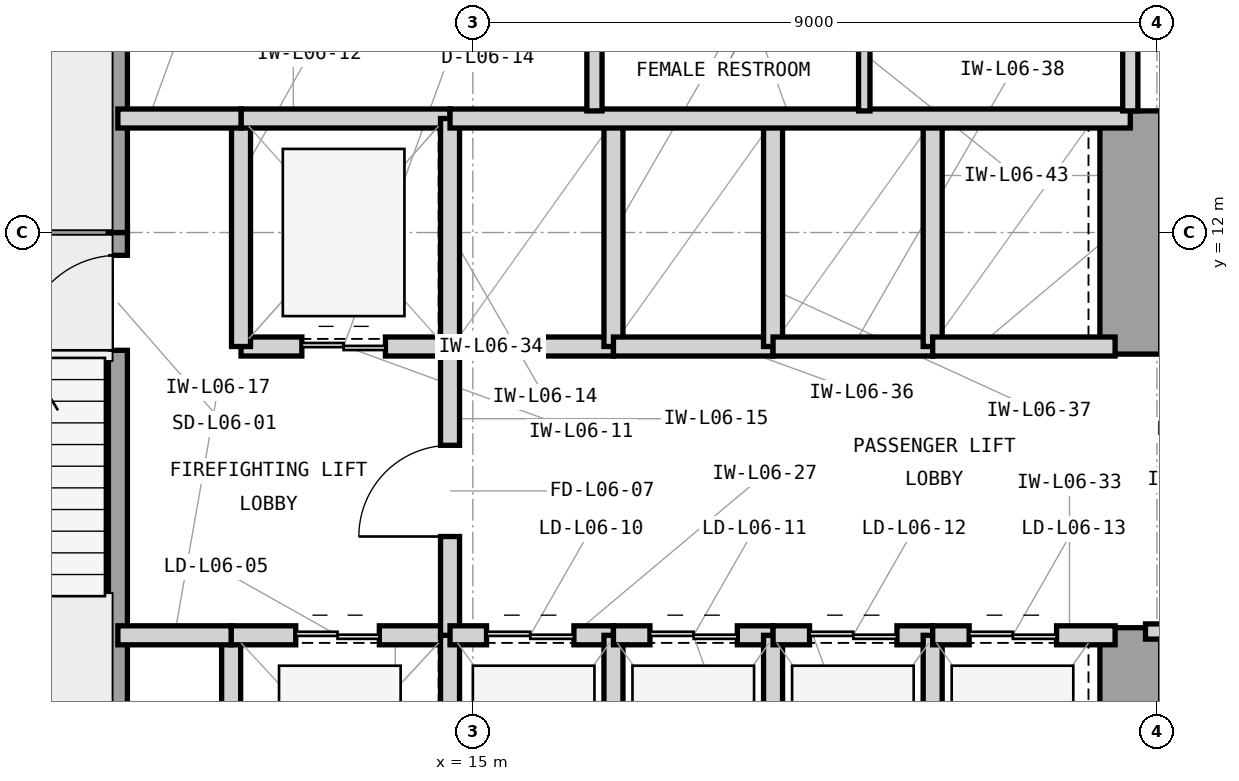
"""IFC4 building model, lengths in metres.
Left out: names, types, materials, properties, quantities, classifications, styles, units other than length and angle.
Written with IfcOpenShell. Run it as: python <this file> out.ifc"""

import sys

from ifc_helpers import new_model, si_unit, direction, frame, frame_2d, origin, place, context, subcontext, project, spatial, rectangle, extrude, element, fill, save


model = new_model("IFC4")
c1 = context("Model", 3, precision=1e-05, world=origin(), true_north=direction((0.0, 1.0)))
c2 = subcontext(c1, "Body", "Model", "MODEL_VIEW")
j1 = project(units=[si_unit("LENGTHUNIT", "METRE"), si_unit("PLANEANGLEUNIT", "RADIAN")], contexts=[c1])
p1 = place(None, origin())
s1 = spatial("IfcSite", under=j1, at=p1, CompositionType="ELEMENT")
p2 = place(p1, origin())
s2 = spatial("IfcBuilding", under=s1, at=p2, CompositionType="ELEMENT")
p3 = place(p2, frame((0.0, 0.0, 30.0)))
s3 = spatial("IfcBuildingStorey", under=s2, at=p3, CompositionType="ELEMENT", Elevation=30.0)
p4 = place(p3, frame((23.65, 3.75, 0.0), z_axis=(0.0, 0.0, 1.0), x_axis=(0.0, 1.0, 0.0)))
e1 = element("IfcWall", 1, at=p4, inside=s3, PredefinedType="SHEAR", context=c2, shape_type="SweptSolid", body=[
    extrude(rectangle(XDim=3.05, YDim=0.8, at=frame_2d((1.525, 0.0))), origin(), (0.0, 0.0, 1.0), 4.2),
])
p5 = place(p3, frame((23.65, 10.4, 0.0), z_axis=(0.0, 0.0, 1.0), x_axis=(0.0, 1.0, 0.0)))
e2 = element("IfcWall", 2, at=p5, inside=s3, PredefinedType="SHEAR", context=c2, shape_type="SweptSolid", body=[
    extrude(rectangle(XDim=3.2, YDim=0.8, at=frame_2d((1.6, 0.0))), origin(), (0.0, 0.0, 1.0), 4.2),
])
p6 = place(p3, frame((6.35, 12.0, 0.0), z_axis=(0.0, 0.0, 1.0), x_axis=(1.0, 0.0, 0.0)))
e3 = element("IfcWall", 3, at=p6, inside=s3, PredefinedType="SHEAR", context=c2, shape_type="SweptSolid", body=[
    extrude(rectangle(XDim=4.105, YDim=0.25, at=frame_2d((2.052, 0.0))), origin(), (0.0, 0.0, 1.0), 4.2),
])
p7 = place(p3, frame((10.33, 4.55, 0.0), z_axis=(0.0, 0.0, 1.0), x_axis=(0.0, 1.0, 0.0)))
e4 = element("IfcWall", 4, at=p7, inside=s3, PredefinedType="SHEAR", context=c2, shape_type="SweptSolid", body=[
    extrude(rectangle(XDim=7.45, YDim=0.25, at=frame_2d((3.725, 0.0))), origin(), (0.0, 0.0, 1.0), 4.2),
])
p8 = place(p7, frame((5.9, 0.0, 0.0)))
e5 = element("IfcOpeningElement", 5, at=p8, cuts=e4, PredefinedType="OPENING", context=c2, shape_type="SweptSolid", body=[
    extrude(rectangle(XDim=1.25, YDim=2.2, at=frame_2d((0.625, 1.1))), frame((0.0, 0.135, 0.0), z_axis=(0.0, -1.0, 0.0), x_axis=(1.0, 0.0, 0.0)), (0.0, 0.0, 1.0), 0.27),
])
p9 = place(p3, frame((10.33, 12.0, 0.0), z_axis=(0.0, 0.0, 1.0), x_axis=(0.0, 1.0, 0.0)))
e6 = element("IfcWall", 6, at=p9, inside=s3, PredefinedType="SHEAR", context=c2, shape_type="SweptSolid", body=[
    extrude(rectangle(XDim=7.45, YDim=0.25, at=frame_2d((3.725, 0.0))), origin(), (0.0, 0.0, 1.0), 4.2),
])
p10 = place(p9, frame((5.85, 0.0, 0.0)))
e7 = element("IfcOpeningElement", 7, at=p10, cuts=e6, PredefinedType="OPENING", context=c2, shape_type="SweptSolid", body=[
    extrude(rectangle(XDim=1.25, YDim=2.2, at=frame_2d((0.625, 1.1))), frame((0.0, 0.135, 0.0), z_axis=(0.0, -1.0, 0.0), x_axis=(1.0, 0.0, 0.0)), (0.0, 0.0, 1.0), 0.27),
])
p11 = place(p3, frame((11.82, 3.35, 0.0), z_axis=(0.0, 0.0, 1.0), x_axis=(0.0, 1.0, 0.0)))
e8 = element("IfcWall", 8, at=p11, inside=s3, PredefinedType="PARTITIONING", context=c2, shape_type="SweptSolid", body=[
    extrude(rectangle(XDim=3.35, YDim=0.25, at=frame_2d((1.675, 0.0))), origin(), (0.0, 0.0, 1.0), 3.97),
])
p12 = place(p3, frame((11.82, 6.7, 0.0), z_axis=(0.0, 0.0, 1.0), x_axis=(1.0, 0.0, 0.0)))
e9 = element("IfcWall", 9, at=p12, inside=s3, PredefinedType="PARTITIONING", context=c2, shape_type="SweptSolid", body=[
    extrude(rectangle(XDim=2.88, YDim=0.25, at=frame_2d((1.44, 0.0))), origin(), (0.0, 0.0, 1.0), 3.426),
])
p13 = place(p12, frame((0.85, 0.0, 0.0)))
e10 = element("IfcOpeningElement", 10, at=p13, cuts=e9, PredefinedType="OPENING", context=c2, shape_type="SweptSolid", body=[
    extrude(rectangle(XDim=1.1, YDim=2.25, at=frame_2d((0.55, 1.125))), frame((0.0, 0.135, 0.0), z_axis=(0.0, -1.0, 0.0), x_axis=(1.0, 0.0, 0.0)), (0.0, 0.0, 1.0), 0.27),
])
p14 = place(p3, frame((14.7, 3.35, 0.0), z_axis=(0.0, 0.0, 1.0), x_axis=(0.0, 1.0, 0.0)))
e11 = element("IfcWall", 11, at=p14, inside=s3, PredefinedType="PARTITIONING", context=c2, shape_type="SweptSolid", body=[
    extrude(rectangle(XDim=3.35, YDim=0.25, at=frame_2d((1.675, 0.0))), origin(), (0.0, 0.0, 1.0), 3.97),
])
p15 = place(p3, frame((11.95, 10.5, 0.0), z_axis=(0.0, 0.0, 1.0), x_axis=(1.0, 0.0, 0.0)))
e12 = element("IfcWall", 12, at=p15, inside=s3, PredefinedType="PARTITIONING", context=c2, shape_type="SweptSolid", body=[
    extrude(rectangle(XDim=2.75, YDim=0.25, at=frame_2d((1.375, 0.0))), origin(), (0.0, 0.0, 1.0), 3.426),
])
p16 = place(p15, frame((0.8, 0.0, 0.0)))
e13 = element("IfcOpeningElement", 13, at=p16, cuts=e12, PredefinedType="OPENING", context=c2, shape_type="SweptSolid", body=[
    extrude(rectangle(XDim=1.1, YDim=2.25, at=frame_2d((0.55, 1.125))), frame((0.0, 0.135, 0.0), z_axis=(0.0, -1.0, 0.0), x_axis=(1.0, 0.0, 0.0)), (0.0, 0.0, 1.0), 0.27),
])
p17 = place(p3, frame((11.95, 10.5, 0.0), z_axis=(0.0, 0.0, 1.0), x_axis=(0.0, 1.0, 0.0)))
e14 = element("IfcWall", 14, at=p17, inside=s3, PredefinedType="PARTITIONING", context=c2, shape_type="SweptSolid", body=[
    extrude(rectangle(XDim=3.0, YDim=0.25, at=frame_2d((1.5, 0.0))), origin(), (0.0, 0.0, 1.0), 3.97),
])
p18 = place(p3, frame((11.95, 13.5, 0.0), z_axis=(0.0, 0.0, 1.0), x_axis=(1.0, 0.0, 0.0)))
e15 = element("IfcWall", 15, at=p18, inside=s3, PredefinedType="PARTITIONING", context=c2, shape_type="SweptSolid", body=[
    extrude(rectangle(XDim=2.75, YDim=0.25, at=frame_2d((1.375, 0.0))), origin(), (0.0, 0.0, 1.0), 3.426),
])
p19 = place(p3, frame((14.7, 10.5, 0.0), z_axis=(0.0, 0.0, 1.0), x_axis=(0.0, 1.0, 0.0)))
e16 = element("IfcWall", 16, at=p19, inside=s3, PredefinedType="PARTITIONING", context=c2, shape_type="SweptSolid", body=[
    extrude(rectangle(XDim=3.0, YDim=0.25, at=frame_2d((1.5, 0.0))), origin(), (0.0, 0.0, 1.0), 3.97),
])
p20 = place(p3, frame((14.7, 6.7, 0.0), z_axis=(0.0, 0.0, 1.0), x_axis=(0.0, 1.0, 0.0)))
e17 = element("IfcWall", 17, at=p20, inside=s3, PredefinedType="PARTITIONING", context=c2, shape_type="SweptSolid", body=[
    extrude(rectangle(XDim=3.8, YDim=0.25, at=frame_2d((1.9, 0.0))), origin(), (0.0, 0.0, 1.0), 3.97),
])
p21 = place(p20, frame((1.3, 0.0, 0.0)))
e18 = element("IfcOpeningElement", 18, at=p21, cuts=e17, PredefinedType="OPENING", context=c2, shape_type="SweptSolid", body=[
    extrude(rectangle(XDim=1.2, YDim=2.2, at=frame_2d((0.6, 1.1))), frame((0.0, 0.135, 0.0), z_axis=(0.0, -1.0, 0.0), x_axis=(1.0, 0.0, 0.0)), (0.0, 0.0, 1.0), 0.27),
])
p22 = place(p3, frame((10.33, 13.5, 0.0), z_axis=(0.0, 0.0, 1.0), x_axis=(1.0, 0.0, 0.0)))
e19 = element("IfcWall", 19, at=p22, inside=s3, PredefinedType="PARTITIONING", context=c2, shape_type="SweptSolid", body=[
    extrude(rectangle(XDim=1.62, YDim=0.25, at=frame_2d((0.81, 0.0))), origin(), (0.0, 0.0, 1.0), 3.426),
])
p23 = place(p3, frame((10.33, 6.7, 0.0), z_axis=(0.0, 0.0, 1.0), x_axis=(1.0, 0.0, 0.0)))
e20 = element("IfcWall", 20, at=p23, inside=s3, PredefinedType="PARTITIONING", context=c2, shape_type="SweptSolid", body=[
    extrude(rectangle(XDim=1.49, YDim=0.25, at=frame_2d((0.745, 0.0))), origin(), (0.0, 0.0, 1.0), 3.426),
])
p24 = place(p3, frame((14.7, 6.7, 0.0), z_axis=(0.0, 0.0, 1.0), x_axis=(1.0, 0.0, 0.0)))
e21 = element("IfcWall", 21, at=p24, inside=s3, PredefinedType="PARTITIONING", context=c2, shape_type="SweptSolid", body=[
    extrude(rectangle(XDim=2.15, YDim=0.25, at=frame_2d((1.075, 0.0))), origin(), (0.0, 0.0, 1.0), 3.426),
])
p25 = place(p24, frame((0.48, 0.0, 0.0)))
e22 = element("IfcOpeningElement", 22, at=p25, cuts=e21, PredefinedType="OPENING", context=c2, shape_type="SweptSolid", body=[
    extrude(rectangle(XDim=1.15, YDim=2.25, at=frame_2d((0.575, 1.125))), frame((0.0, 0.135, 0.0), z_axis=(0.0, -1.0, 0.0), x_axis=(1.0, 0.0, 0.0)), (0.0, 0.0, 1.0), 0.27),
])
p26 = place(p3, frame((16.85, 3.35, 0.0), z_axis=(0.0, 0.0, 1.0), x_axis=(0.0, 1.0, 0.0)))
e23 = element("IfcWall", 23, at=p26, inside=s3, PredefinedType="PARTITIONING", context=c2, shape_type="SweptSolid", body=[
    extrude(rectangle(XDim=3.35, YDim=0.25, at=frame_2d((1.675, 0.0))), origin(), (0.0, 0.0, 1.0), 3.97),
])
p27 = place(p3, frame((16.85, 6.7, 0.0), z_axis=(0.0, 0.0, 1.0), x_axis=(1.0, 0.0, 0.0)))
e24 = element("IfcWall", 24, at=p27, inside=s3, PredefinedType="PARTITIONING", context=c2, shape_type="SweptSolid", body=[
    extrude(rectangle(XDim=2.1, YDim=0.25, at=frame_2d((1.05, 0.0))), origin(), (0.0, 0.0, 1.0), 3.426),
])
p28 = place(p27, frame((0.48, 0.0, 0.0)))
e25 = element("IfcOpeningElement", 25, at=p28, cuts=e24, PredefinedType="OPENING", context=c2, shape_type="SweptSolid", body=[
    extrude(rectangle(XDim=1.15, YDim=2.25, at=frame_2d((0.575, 1.125))), frame((0.0, 0.135, 0.0), z_axis=(0.0, -1.0, 0.0), x_axis=(1.0, 0.0, 0.0)), (0.0, 0.0, 1.0), 0.27),
])
p29 = place(p3, frame((18.95, 3.35, 0.0), z_axis=(0.0, 0.0, 1.0), x_axis=(0.0, 1.0, 0.0)))
e26 = element("IfcWall", 26, at=p29, inside=s3, PredefinedType="PARTITIONING", context=c2, shape_type="SweptSolid", body=[
    extrude(rectangle(XDim=3.35, YDim=0.25, at=frame_2d((1.675, 0.0))), origin(), (0.0, 0.0, 1.0), 3.97),
])
p30 = place(p3, frame((18.95, 6.7, 0.0), z_axis=(0.0, 0.0, 1.0), x_axis=(1.0, 0.0, 0.0)))
e27 = element("IfcWall", 27, at=p30, inside=s3, PredefinedType="PARTITIONING", context=c2, shape_type="SweptSolid", body=[
    extrude(rectangle(XDim=2.1, YDim=0.25, at=frame_2d((1.05, 0.0))), origin(), (0.0, 0.0, 1.0), 3.426),
])
p31 = place(p30, frame((0.48, 0.0, 0.0)))
e28 = element("IfcOpeningElement", 28, at=p31, cuts=e27, PredefinedType="OPENING", context=c2, shape_type="SweptSolid", body=[
    extrude(rectangle(XDim=1.15, YDim=2.25, at=frame_2d((0.575, 1.125))), frame((0.0, 0.135, 0.0), z_axis=(0.0, -1.0, 0.0), x_axis=(1.0, 0.0, 0.0)), (0.0, 0.0, 1.0), 0.27),
])
p32 = place(p3, frame((21.05, 3.35, 0.0), z_axis=(0.0, 0.0, 1.0), x_axis=(0.0, 1.0, 0.0)))
e29 = element("IfcWall", 29, at=p32, inside=s3, PredefinedType="PARTITIONING", context=c2, shape_type="SweptSolid", body=[
    extrude(rectangle(XDim=3.35, YDim=0.25, at=frame_2d((1.675, 0.0))), origin(), (0.0, 0.0, 1.0), 3.97),
])
p33 = place(p3, frame((21.05, 6.7, 0.0), z_axis=(0.0, 0.0, 1.0), x_axis=(1.0, 0.0, 0.0)))
e30 = element("IfcWall", 30, at=p33, inside=s3, PredefinedType="PARTITIONING", context=c2, shape_type="SweptSolid", body=[
    extrude(rectangle(XDim=2.4, YDim=0.25, at=frame_2d((1.2, 0.0))), origin(), (0.0, 0.0, 1.0), 3.426),
])
p34 = place(p33, frame((0.48, 0.0, 0.0)))
e31 = element("IfcOpeningElement", 31, at=p34, cuts=e30, PredefinedType="OPENING", context=c2, shape_type="SweptSolid", body=[
    extrude(rectangle(XDim=1.15, YDim=2.25, at=frame_2d((0.575, 1.125))), frame((0.0, 0.135, 0.0), z_axis=(0.0, -1.0, 0.0), x_axis=(1.0, 0.0, 0.0)), (0.0, 0.0, 1.0), 0.27),
])
p35 = place(p3, frame((14.7, 10.5, 0.0), z_axis=(0.0, 0.0, 1.0), x_axis=(1.0, 0.0, 0.0)))
e32 = element("IfcWall", 32, at=p35, inside=s3, PredefinedType="PARTITIONING", context=c2, shape_type="SweptSolid", body=[
    extrude(rectangle(XDim=2.15, YDim=0.25, at=frame_2d((1.075, 0.0))), origin(), (0.0, 0.0, 1.0), 3.426),
])
p36 = place(p3, frame((16.85, 10.5, 0.0), z_axis=(0.0, 0.0, 1.0), x_axis=(0.0, 1.0, 0.0)))
e33 = element("IfcWall", 33, at=p36, inside=s3, PredefinedType="PARTITIONING", context=c2, shape_type="SweptSolid", body=[
    extrude(rectangle(XDim=3.0, YDim=0.25, at=frame_2d((1.5, 0.0))), origin(), (0.0, 0.0, 1.0), 3.97),
])
p37 = place(p3, frame((16.85, 10.5, 0.0), z_axis=(0.0, 0.0, 1.0), x_axis=(1.0, 0.0, 0.0)))
e34 = element("IfcWall", 34, at=p37, inside=s3, PredefinedType="PARTITIONING", context=c2, shape_type="SweptSolid", body=[
    extrude(rectangle(XDim=2.1, YDim=0.25, at=frame_2d((1.05, 0.0))), origin(), (0.0, 0.0, 1.0), 3.426),
])
p38 = place(p3, frame((18.95, 10.5, 0.0), z_axis=(0.0, 0.0, 1.0), x_axis=(0.0, 1.0, 0.0)))
e35 = element("IfcWall", 35, at=p38, inside=s3, PredefinedType="PARTITIONING", context=c2, shape_type="SweptSolid", body=[
    extrude(rectangle(XDim=3.0, YDim=0.25, at=frame_2d((1.5, 0.0))), origin(), (0.0, 0.0, 1.0), 3.97),
])
p39 = place(p3, frame((18.95, 10.5, 0.0), z_axis=(0.0, 0.0, 1.0), x_axis=(1.0, 0.0, 0.0)))
e36 = element("IfcWall", 36, at=p39, inside=s3, PredefinedType="PARTITIONING", context=c2, shape_type="SweptSolid", body=[
    extrude(rectangle(XDim=2.1, YDim=0.25, at=frame_2d((1.05, 0.0))), origin(), (0.0, 0.0, 1.0), 3.426),
])
p40 = place(p3, frame((21.05, 10.5, 0.0), z_axis=(0.0, 0.0, 1.0), x_axis=(0.0, 1.0, 0.0)))
e37 = element("IfcWall", 37, at=p40, inside=s3, PredefinedType="PARTITIONING", context=c2, shape_type="SweptSolid", body=[
    extrude(rectangle(XDim=3.0, YDim=0.25, at=frame_2d((1.5, 0.0))), origin(), (0.0, 0.0, 1.0), 3.97),
])
p41 = place(p3, frame((21.05, 10.5, 0.0), z_axis=(0.0, 0.0, 1.0), x_axis=(1.0, 0.0, 0.0)))
e38 = element("IfcWall", 38, at=p41, inside=s3, PredefinedType="PARTITIONING", context=c2, shape_type="SweptSolid", body=[
    extrude(rectangle(XDim=2.4, YDim=0.25, at=frame_2d((1.2, 0.0))), origin(), (0.0, 0.0, 1.0), 3.426),
])
p42 = place(p3, frame((14.7, 13.5, 0.0), z_axis=(0.0, 0.0, 1.0), x_axis=(1.0, 0.0, 0.0)))
e39 = element("IfcWall", 39, at=p42, inside=s3, PredefinedType="PARTITIONING", context=c2, shape_type="SweptSolid", body=[
    extrude(rectangle(XDim=8.95, YDim=0.25, at=frame_2d((4.475, 0.0))), origin(), (0.0, 0.0, 1.0), 3.426),
])
p43 = place(p3, frame((16.6, 13.6, 0.0), z_axis=(0.0, 0.0, 1.0), x_axis=(0.0, 1.0, 0.0)))
e40 = element("IfcWall", 40, at=p43, inside=s3, PredefinedType="PARTITIONING", context=c2, shape_type="SweptSolid", body=[
    extrude(rectangle(XDim=3.0, YDim=0.2, at=frame_2d((1.5, 0.0))), origin(), (0.0, 0.0, 1.0), 3.97),
])
p44 = place(p43, frame((1.02, 0.0, 0.0)))
e41 = element("IfcOpeningElement", 41, at=p44, cuts=e40, PredefinedType="OPENING", context=c2, shape_type="SweptSolid", body=[
    extrude(rectangle(XDim=0.95, YDim=2.1, at=frame_2d((0.475, 1.05))), frame((0.0, 0.11, 0.0), z_axis=(0.0, -1.0, 0.0), x_axis=(1.0, 0.0, 0.0)), (0.0, 0.0, 1.0), 0.22),
])
p45 = place(p3, frame((20.15, 13.6, 0.0), z_axis=(0.0, 0.0, 1.0), x_axis=(0.0, 1.0, 0.0)))
e42 = element("IfcWall", 42, at=p45, inside=s3, PredefinedType="PARTITIONING", context=c2, shape_type="SweptSolid", body=[
    extrude(rectangle(XDim=3.0, YDim=0.15, at=frame_2d((1.5, 0.0))), origin(), (0.0, 0.0, 1.0), 3.97),
])
p46 = place(p3, frame((23.65, 13.6, 0.0), z_axis=(0.0, 0.0, 1.0), x_axis=(0.0, 1.0, 0.0)))
e43 = element("IfcWall", 43, at=p46, inside=s3, PredefinedType="PARTITIONING", context=c2, shape_type="SweptSolid", body=[
    extrude(rectangle(XDim=3.0, YDim=0.2, at=frame_2d((1.5, 0.0))), origin(), (0.0, 0.0, 1.0), 3.97),
])
p47 = place(p46, frame((1.02, 0.0, 0.0)))
e44 = element("IfcOpeningElement", 44, at=p47, cuts=e43, PredefinedType="OPENING", context=c2, shape_type="SweptSolid", body=[
    extrude(rectangle(XDim=0.95, YDim=2.1, at=frame_2d((0.475, 1.05))), frame((0.0, 0.11, 0.0), z_axis=(0.0, -1.0, 0.0), x_axis=(1.0, 0.0, 0.0)), (0.0, 0.0, 1.0), 0.22),
])
p48 = place(p3, frame((23.85, 6.75, 0.0), z_axis=(0.0, 0.0, 1.0), x_axis=(1.0, 0.0, 0.0)))
e45 = element("IfcWall", 45, at=p48, inside=s3, PredefinedType="PARTITIONING", context=c2, shape_type="SweptSolid", body=[
    extrude(rectangle(XDim=2.85, YDim=0.2, at=frame_2d((1.425, 0.0))), origin(), (0.0, 0.0, 1.0), 3.97),
])
p49 = place(p48, frame((0.7, 0.0, 0.0)))
e46 = element("IfcOpeningElement", 46, at=p49, cuts=e45, PredefinedType="OPENING", context=c2, shape_type="SweptSolid", body=[
    extrude(rectangle(XDim=1.0, YDim=2.15, at=frame_2d((0.5, 1.075))), frame((0.0, 0.11, 0.0), z_axis=(0.0, -1.0, 0.0), x_axis=(1.0, 0.0, 0.0)), (0.0, 0.0, 1.0), 0.22),
])
p50 = place(p8, origin())
e47 = element("IfcDoor", 47, at=p50, inside=s3, OperationType="SINGLE_SWING_LEFT", PredefinedType="DOOR", context=c2, shape_type="SweptSolid", body=[
    extrude(rectangle(XDim=1.25, YDim=2.2, at=frame_2d((0.625, 1.1))), frame((0.0, 0.025, 0.0), z_axis=(0.0, -1.0, 0.0), x_axis=(1.0, 0.0, 0.0)), (0.0, 0.0, 1.0), 0.05),
])
fill(e5, e47)
p51 = place(p13, origin())
e48 = element("IfcDoor", 48, at=p51, inside=s3, OperationType="DOUBLE_DOOR_SLIDING", PredefinedType="DOOR", context=c2, shape_type="SweptSolid", body=[
    extrude(rectangle(XDim=1.1, YDim=2.25, at=frame_2d((0.55, 1.125))), frame((0.0, 0.025, 0.0), z_axis=(0.0, -1.0, 0.0), x_axis=(1.0, 0.0, 0.0)), (0.0, 0.0, 1.0), 0.05),
])
fill(e10, e48)
p52 = place(p16, origin())
e49 = element("IfcDoor", 49, at=p52, inside=s3, OperationType="DOUBLE_DOOR_SLIDING", PredefinedType="DOOR", context=c2, shape_type="SweptSolid", body=[
    extrude(rectangle(XDim=1.1, YDim=2.25, at=frame_2d((0.55, 1.125))), frame((0.0, 0.025, 0.0), z_axis=(0.0, -1.0, 0.0), x_axis=(1.0, 0.0, 0.0)), (0.0, 0.0, 1.0), 0.05),
])
fill(e13, e49)
p53 = place(p21, origin())
e50 = element("IfcDoor", 50, at=p53, inside=s3, OperationType="SINGLE_SWING_LEFT", PredefinedType="DOOR", context=c2, shape_type="SweptSolid", body=[
    extrude(rectangle(XDim=1.2, YDim=2.2, at=frame_2d((0.6, 1.1))), frame((0.0, 0.025, 0.0), z_axis=(0.0, -1.0, 0.0), x_axis=(1.0, 0.0, 0.0)), (0.0, 0.0, 1.0), 0.05),
])
fill(e18, e50)
p54 = place(p25, origin())
e51 = element("IfcDoor", 51, at=p54, inside=s3, OperationType="DOUBLE_DOOR_SLIDING", PredefinedType="DOOR", context=c2, shape_type="SweptSolid", body=[
    extrude(rectangle(XDim=1.15, YDim=2.25, at=frame_2d((0.575, 1.125))), frame((0.0, 0.025, 0.0), z_axis=(0.0, -1.0, 0.0), x_axis=(1.0, 0.0, 0.0)), (0.0, 0.0, 1.0), 0.05),
])
fill(e22, e51)
p55 = place(p28, origin())
e52 = element("IfcDoor", 52, at=p55, inside=s3, OperationType="DOUBLE_DOOR_SLIDING", PredefinedType="DOOR", context=c2, shape_type="SweptSolid", body=[
    extrude(rectangle(XDim=1.15, YDim=2.25, at=frame_2d((0.575, 1.125))), frame((0.0, 0.025, 0.0), z_axis=(0.0, -1.0, 0.0), x_axis=(1.0, 0.0, 0.0)), (0.0, 0.0, 1.0), 0.05),
])
fill(e25, e52)
p56 = place(p31, origin())
e53 = element("IfcDoor", 53, at=p56, inside=s3, OperationType="DOUBLE_DOOR_SLIDING", PredefinedType="DOOR", context=c2, shape_type="SweptSolid", body=[
    extrude(rectangle(XDim=1.15, YDim=2.25, at=frame_2d((0.575, 1.125))), frame((0.0, 0.025, 0.0), z_axis=(0.0, -1.0, 0.0), x_axis=(1.0, 0.0, 0.0)), (0.0, 0.0, 1.0), 0.05),
])
fill(e28, e53)
p57 = place(p34, origin())
e54 = element("IfcDoor", 54, at=p57, inside=s3, OperationType="DOUBLE_DOOR_SLIDING", PredefinedType="DOOR", context=c2, shape_type="SweptSolid", body=[
    extrude(rectangle(XDim=1.15, YDim=2.25, at=frame_2d((0.575, 1.125))), frame((0.0, 0.025, 0.0), z_axis=(0.0, -1.0, 0.0), x_axis=(1.0, 0.0, 0.0)), (0.0, 0.0, 1.0), 0.05),
])
fill(e31, e54)
save(model, sys.argv[1])
